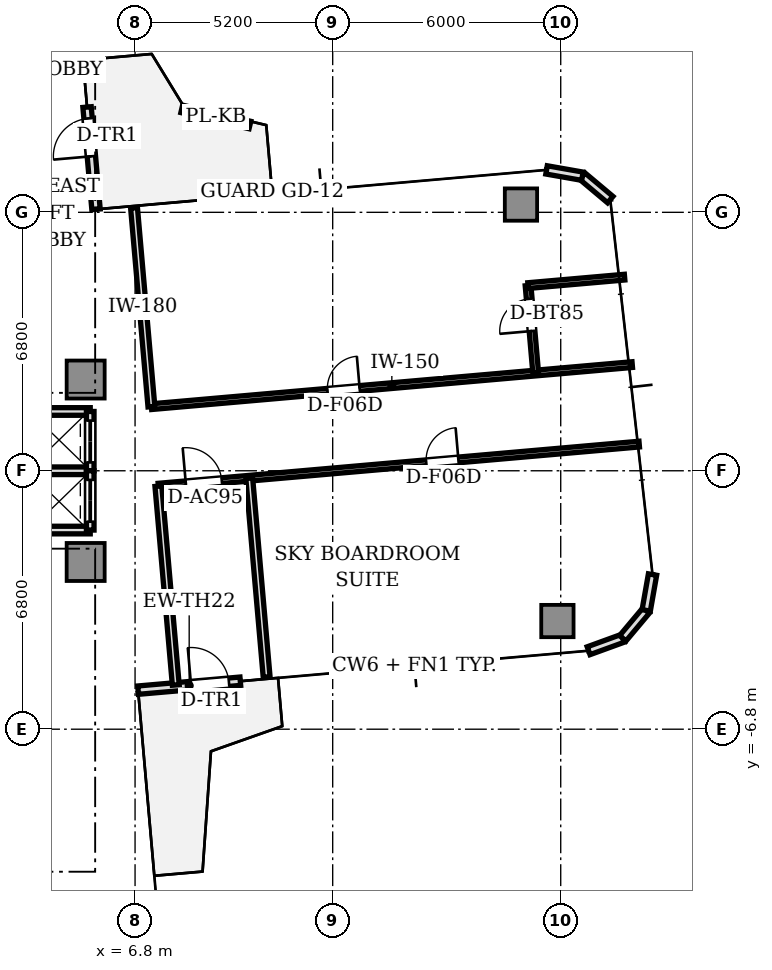
"""IFC4 building model, lengths in metres.
Left out: names, types, materials, properties, quantities, classifications, styles, units other than length and angle.
Written with IfcOpenShell. Run it as: python <this file> out.ifc"""

import sys

from ifc_helpers import new_model, si_unit, direction, frame, frame_2d, origin, origin_2d, place, context, subcontext, project, spatial, rectangle, extrude, source, transform, mapped, element, fill, save


model = new_model("IFC4")
c1 = context("Model", 3, precision=1e-05, world=origin(), true_north=direction((0.0, 1.0)))
c2 = subcontext(c1, "Body", "Model", "MODEL_VIEW")
j1 = project(units=[si_unit("LENGTHUNIT", "METRE"), si_unit("PLANEANGLEUNIT", "RADIAN")], contexts=[c1])
p1 = place(None, origin())
s1 = spatial("IfcSite", under=j1, at=p1, CompositionType="ELEMENT")
p2 = place(p1, origin())
s2 = spatial("IfcBuilding", under=s1, at=p2, CompositionType="ELEMENT")
p3 = place(p2, frame((0.0, 0.0, 142.75)))
s3 = spatial("IfcBuildingStorey", under=s2, at=p3, CompositionType="ELEMENT", Elevation=142.75)
m1 = source(origin(), c2, "Body", "SweptSolid", [
    extrude(rectangle(XDim=1.0, YDim=1.0, at=origin_2d()), origin(), (0.0, 0.0, 1.0), 4.26),
])
for number, where, z_axis, x_axis in (
    (1, (5.5, 2.4, 0.0), (0.0, 0.0, 1.0), (1.0, 0.0, 0.0)),
    (2, (5.5, -2.4, 0.0), (0.0, 0.0, 1.0), (1.0, 0.0, 0.0)),
):
    element("IfcColumn", number, at=place(p3, frame(where, z_axis=z_axis, x_axis=x_axis)), inside=s3, PredefinedType="COLUMN", context=c2, shape_type="MappedRepresentation", body=[
        mapped(m1, transform((0.0, 0.0, 0.0), scale=1.0)),
    ])
m2 = source(origin(), c2, "Body", "SweptSolid", [
    extrude(rectangle(XDim=0.85, YDim=0.85, at=origin_2d()), origin(), (0.0, 0.0, 1.0), 4.26),
])
for number, where, z_axis, x_axis in (
    (3, (17.913, -3.954, 0.0), (0.0, 0.0, 1.0), (1.0, 0.0, 0.0)),
    (4, (16.954, 7.004, 0.0), (0.0, 0.0, 1.0), (1.0, 0.0, 0.0)),
):
    element("IfcColumn", number, at=place(p3, frame(where, z_axis=z_axis, x_axis=x_axis)), inside=s3, PredefinedType="COLUMN", context=c2, shape_type="MappedRepresentation", body=[
        mapped(m2, transform((0.0, 0.0, 0.0), scale=1.0)),
    ])
p4 = place(p3, frame((6.879, -5.772, 0.0), z_axis=(0.0, 0.0, 1.0), x_axis=(0.996193619346, 0.087168071984, 0.0)))
e5 = element("IfcWall", 5, at=p4, inside=s3, PredefinedType="STANDARD", context=c2, shape_type="SweptSolid", body=[
    extrude(rectangle(XDim=2.7, YDim=0.22, at=frame_2d((1.35, 0.0))), origin(), (0.0, 0.0, 1.0), 4.26),
])
p5 = place(p4, frame((1.4, 0.0, 0.0)))
e6 = element("IfcOpeningElement", 6, at=p5, cuts=e5, PredefinedType="OPENING", context=c2, shape_type="SweptSolid", body=[
    extrude(rectangle(XDim=1.0, YDim=2.2, at=frame_2d((0.5, 1.1))), frame((0.0, 0.12, 0.0), z_axis=(0.0, -1.0, 0.0), x_axis=(1.0, 0.0, 0.0)), (0.0, 0.0, 1.0), 0.24),
])
p6 = place(p3, frame((18.734, -4.735, 0.0), z_axis=(0.0, 0.0, 1.0), x_axis=(0.939741306239, 0.34188635151, 0.0)))
e7 = element("IfcWall", 7, at=p6, inside=s3, PredefinedType="STANDARD", context=c2, shape_type="SweptSolid", body=[
    extrude(rectangle(XDim=0.958, YDim=0.22, at=frame_2d((0.479, 0.0))), origin(), (0.0, 0.0, 1.0), 4.26),
])
for number, where, z_axis, x_axis in (
    (8, (19.634, -4.408, 0.0), (0.0, 0.0, 1.0), (0.643, 0.766, 0.0)),
    (9, (20.25, -3.674, 0.0), (0.0, 0.0, 1.0), (0.174, 0.985, 0.0)),
):
    element("IfcWall", number, at=place(p3, frame(where, z_axis=z_axis, x_axis=x_axis)), inside=s3, PredefinedType="STANDARD", context=c2, shape_type="SweptSolid", body=[
        extrude(rectangle(XDim=0.958, YDim=0.22, at=frame_2d((0.479, 0.0))), origin(), (0.0, 0.0, 1.0), 4.26),
    ])
p7 = place(p3, frame((19.304, 7.135, 0.0), z_axis=(0.0, 0.0, 1.0), x_axis=(-0.766001159887, 0.642839189107, 0.0)))
e10 = element("IfcWall", 10, at=p7, inside=s3, PredefinedType="STANDARD", context=c2, shape_type="SweptSolid", body=[
    extrude(rectangle(XDim=0.958, YDim=0.22, at=frame_2d((0.479, 0.0))), origin(), (0.0, 0.0, 1.0), 4.26),
])
p8 = place(p3, frame((18.57, 7.75, 0.0), z_axis=(0.0, 0.0, 1.0), x_axis=(-0.984770724397, 0.173858046606, 0.0)))
e11 = element("IfcWall", 11, at=p8, inside=s3, PredefinedType="STANDARD", context=c2, shape_type="SweptSolid", body=[
    extrude(rectangle(XDim=0.958, YDim=0.22, at=frame_2d((0.479, 0.0))), origin(), (0.0, 0.0, 1.0), 4.26),
])
p9 = place(p3, frame((5.772, 6.879, 0.0), z_axis=(0.0, 0.0, 1.0), x_axis=(-0.087168071984, 0.996193619346, 0.0)))
e12 = element("IfcWall", 12, at=p9, inside=s3, PredefinedType="STANDARD", context=c2, shape_type="SweptSolid", body=[
    extrude(rectangle(XDim=2.7, YDim=0.22, at=frame_2d((1.35, 0.0))), origin(), (0.0, 0.0, 1.0), 4.26),
])
p10 = place(p9, frame((1.4, 0.0, 0.0)))
e13 = element("IfcOpeningElement", 13, at=p10, cuts=e12, PredefinedType="OPENING", context=c2, shape_type="SweptSolid", body=[
    extrude(rectangle(XDim=1.0, YDim=2.2, at=frame_2d((0.5, 1.1))), frame((0.0, 0.12, 0.0), z_axis=(0.0, -1.0, 0.0), x_axis=(1.0, 0.0, 0.0)), (0.0, 0.0, 1.0), 0.24),
])
p11 = place(p3, frame((9.822, 9.097, 0.0), z_axis=(0.0, 0.0, 1.0), x_axis=(-0.97309123406, 0.230420160135, 0.0)))
e14 = element("IfcWall", 14, at=p11, inside=s3, PredefinedType="PARAPET", context=c2, shape_type="SweptSolid", body=[
    extrude(rectangle(XDim=1.843, YDim=0.2, at=frame_2d((0.921, 0.0))), origin(), (0.0, 0.0, 1.0), 0.65),
])
for number, where, z_axis, x_axis in (
    (15, (3.98, 1.56, 0.0), (0.0, 0.0, 1.0), (1.0, 0.0, 0.0)),
    (16, (3.98, -1.56, 0.0), (0.0, 0.0, 1.0), (1.0, 0.0, 0.0)),
    (17, (3.98, 0.0, 0.0), (0.0, 0.0, 1.0), (1.0, 0.0, 0.0)),
):
    element("IfcWall", number, at=place(p3, frame(where, z_axis=z_axis, x_axis=x_axis)), inside=s3, PredefinedType="SOLIDWALL", context=c2, shape_type="SweptSolid", body=[
        extrude(rectangle(XDim=1.64, YDim=0.2, at=frame_2d((0.82, 0.0))), origin(), (0.0, 0.0, 1.0), 3.81),
    ])
p12 = place(p3, frame((5.62, 0.0, 0.0), z_axis=(0.0, 0.0, 1.0), x_axis=(0.0, 1.0, 0.0)))
e18 = element("IfcWall", 18, at=p12, inside=s3, PredefinedType="SOLIDWALL", context=c2, shape_type="SweptSolid", body=[
    extrude(rectangle(XDim=1.56, YDim=0.2, at=frame_2d((0.78, 0.0))), origin(), (0.0, 0.0, 1.0), 3.81),
])
p13 = place(p12, frame((0.22, 0.0, 0.0)))
e19 = element("IfcOpeningElement", 19, at=p13, cuts=e18, PredefinedType="OPENING", context=c2, shape_type="SweptSolid", body=[
    extrude(rectangle(XDim=1.1, YDim=2.2, at=frame_2d((0.55, 1.1))), frame((0.0, 0.11, 0.0), z_axis=(0.0, -1.0, 0.0), x_axis=(1.0, 0.0, 0.0)), (0.0, 0.0, 1.0), 0.22),
])
p14 = place(p3, frame((5.62, -1.56, 0.0), z_axis=(0.0, 0.0, 1.0), x_axis=(0.0, 1.0, 0.0)))
e20 = element("IfcWall", 20, at=p14, inside=s3, PredefinedType="SOLIDWALL", context=c2, shape_type="SweptSolid", body=[
    extrude(rectangle(XDim=1.56, YDim=0.2, at=frame_2d((0.78, 0.0))), origin(), (0.0, 0.0, 1.0), 3.81),
])
p15 = place(p14, frame((0.22, 0.0, 0.0)))
e21 = element("IfcOpeningElement", 21, at=p15, cuts=e20, PredefinedType="OPENING", context=c2, shape_type="SweptSolid", body=[
    extrude(rectangle(XDim=1.1, YDim=2.2, at=frame_2d((0.55, 1.1))), frame((0.0, 0.11, 0.0), z_axis=(0.0, -1.0, 0.0), x_axis=(1.0, 0.0, 0.0)), (0.0, 0.0, 1.0), 0.22),
])
p16 = place(p3, frame((7.23, 1.687, 0.0), z_axis=(0.0, 0.0, 1.0), x_axis=(0.996194280863, 0.087160511558, 0.0)))
e22 = element("IfcWall", 22, at=p16, inside=s3, PredefinedType="PARTITIONING", context=c2, shape_type="SweptSolid", body=[
    extrude(rectangle(XDim=12.7, YDim=0.15, at=frame_2d((6.35, 0.0))), origin(), (0.0, 0.0, 1.0), 3.81),
])
p17 = place(p16, frame((4.65, 0.0, 0.0)))
e23 = element("IfcOpeningElement", 23, at=p17, cuts=e22, PredefinedType="OPENING", context=c2, shape_type="SweptSolid", body=[
    extrude(rectangle(XDim=0.85, YDim=2.1, at=frame_2d((0.425, 1.05))), frame((0.0, 0.085, 0.0), z_axis=(0.0, -1.0, 0.0), x_axis=(1.0, 0.0, 0.0)), (0.0, 0.0, 1.0), 0.17),
])
p18 = place(p3, frame((7.414, -0.406, 0.0), z_axis=(0.0, 0.0, 1.0), x_axis=(0.996194280863, 0.087160511558, 0.0)))
e24 = element("IfcWall", 24, at=p18, inside=s3, PredefinedType="PARTITIONING", context=c2, shape_type="SweptSolid", body=[
    extrude(rectangle(XDim=12.7, YDim=0.15, at=frame_2d((6.35, 0.0))), origin(), (0.0, 0.0, 1.0), 3.81),
])
p19 = place(p18, frame((0.725, 0.0, 0.0)))
e25 = element("IfcOpeningElement", 25, at=p19, cuts=e24, PredefinedType="OPENING", context=c2, shape_type="SweptSolid", body=[
    extrude(rectangle(XDim=0.95, YDim=2.15, at=frame_2d((0.475, 1.075))), frame((0.0, 0.085, 0.0), z_axis=(0.0, -1.0, 0.0), x_axis=(1.0, 0.0, 0.0)), (0.0, 0.0, 1.0), 0.17),
])
p20 = place(p18, frame((7.075, 0.0, 0.0)))
e26 = element("IfcOpeningElement", 26, at=p20, cuts=e24, PredefinedType="OPENING", context=c2, shape_type="SweptSolid", body=[
    extrude(rectangle(XDim=0.85, YDim=2.1, at=frame_2d((0.425, 1.05))), frame((0.0, 0.085, 0.0), z_axis=(0.0, -1.0, 0.0), x_axis=(1.0, 0.0, 0.0)), (0.0, 0.0, 1.0), 0.17),
])
for number, where, z_axis, x_axis in (
    (27, (7.23, 1.687, 0.0), (0.0, 0.0, 1.0), (-0.087, 0.996, 0.0)),
    (28, (7.871, -5.635, 0.0), (0.0, 0.0, 1.0), (-0.087, 0.996, 0.0)),
):
    element("IfcWall", number, at=place(p3, frame(where, z_axis=z_axis, x_axis=x_axis)), inside=s3, PredefinedType="PARTITIONING", context=c2, shape_type="SweptSolid", body=[
        extrude(rectangle(XDim=5.25, YDim=0.18, at=frame_2d((2.625, 0.0))), origin(), (0.0, 0.0, 1.0), 3.81),
    ])
p21 = place(p3, frame((17.342, 2.571, 0.0), z_axis=(0.0, 0.0, 1.0), x_axis=(-0.087094835072, 0.996200024947, 0.0)))
e29 = element("IfcWall", 29, at=p21, inside=s3, PredefinedType="PARTITIONING", context=c2, shape_type="SweptSolid", body=[
    extrude(rectangle(XDim=2.31, YDim=0.15, at=frame_2d((1.155, 0.0))), origin(), (0.0, 0.0, 1.0), 3.78),
])
p22 = place(p21, frame((1.11, 0.0, 0.0)))
e30 = element("IfcOpeningElement", 30, at=p22, cuts=e29, PredefinedType="OPENING", context=c2, shape_type="SweptSolid", body=[
    extrude(rectangle(XDim=0.85, YDim=2.1, at=frame_2d((0.425, 1.05))), frame((0.0, 0.085, 0.0), z_axis=(0.0, -1.0, 0.0), x_axis=(1.0, 0.0, 0.0)), (0.0, 0.0, 1.0), 0.17),
])
p23 = place(p3, frame((17.141, 4.872, 0.0), z_axis=(0.0, 0.0, 1.0), x_axis=(0.996189039596, 0.08722039549, 0.0)))
e31 = element("IfcWall", 31, at=p23, inside=s3, PredefinedType="PARTITIONING", context=c2, shape_type="SweptSolid", body=[
    extrude(rectangle(XDim=2.55, YDim=0.15, at=frame_2d((1.275, 0.0))), origin(), (0.0, 0.0, 1.0), 3.81),
])
p24 = place(p3, frame((9.804, -0.196, 0.0), z_axis=(0.0, 0.0, 1.0), x_axis=(0.087147336495, -0.996195433508, 0.0)))
e32 = element("IfcWall", 32, at=p24, inside=s3, PredefinedType="PARTITIONING", context=c2, shape_type="SweptSolid", body=[
    extrude(rectangle(XDim=5.25, YDim=0.18, at=frame_2d((2.625, 0.0))), origin(), (0.0, 0.0, 1.0), 3.81),
])
p25 = place(p3, frame((5.287, 11.856, 0.0), z_axis=(0.0, 0.0, 1.0), x_axis=(-0.996194790044, -0.087154691724, 0.0)))
e33 = element("IfcWall", 33, at=p25, inside=s3, PredefinedType="PARTITIONING", context=c2, shape_type="SweptSolid", body=[
    extrude(rectangle(XDim=12.6, YDim=0.15, at=frame_2d((6.3, 0.0))), origin(), (0.0, 0.0, 1.0), 3.81),
])
p26 = place(p25, frame((5.5, 0.0, 0.0)))
e34 = element("IfcOpeningElement", 34, at=p26, cuts=e33, PredefinedType="OPENING", context=c2, shape_type="SweptSolid", body=[
    extrude(rectangle(XDim=1.6, YDim=2.25, at=frame_2d((0.8, 1.125))), frame((0.0, 0.085, 0.0), z_axis=(0.0, -1.0, 0.0), x_axis=(1.0, 0.0, 0.0)), (0.0, 0.0, 1.0), 0.17),
])
m3 = source(origin(), c2, "Body", "SweptSolid", [
    extrude(rectangle(XDim=1.0, YDim=0.05, at=origin_2d()), origin(), (0.0, 0.0, 1.0), 2.2),
])
p27 = place(p5, frame((0.5, 0.0, 0.0)))
e35 = element("IfcDoor", 35, at=p27, inside=s3, OperationType="SINGLE_SWING_LEFT", PredefinedType="DOOR", context=c2, shape_type="MappedRepresentation", body=[
    mapped(m3, transform((0.0, 0.0, 0.0), scale=1.0)),
])
fill(e6, e35)
p28 = place(p10, frame((0.5, 0.0, 0.0)))
e36 = element("IfcDoor", 36, at=p28, inside=s3, OperationType="SINGLE_SWING_LEFT", PredefinedType="DOOR", context=c2, shape_type="MappedRepresentation", body=[
    mapped(m3, transform((0.0, 0.0, 0.0), scale=1.0)),
])
fill(e13, e36)
m4 = source(origin(), c2, "Body", "SweptSolid", [
    extrude(rectangle(XDim=1.1, YDim=0.05, at=origin_2d()), origin(), (0.0, 0.0, 1.0), 2.2),
])
p29 = place(p13, frame((0.55, 0.0, 0.0)))
e37 = element("IfcDoor", 37, at=p29, inside=s3, OperationType="DOUBLE_DOOR_SLIDING", PredefinedType="DOOR", context=c2, shape_type="MappedRepresentation", body=[
    mapped(m4, transform((0.0, 0.0, 0.0), scale=1.0)),
])
fill(e19, e37)
p30 = place(p15, frame((0.55, 0.0, 0.0)))
e38 = element("IfcDoor", 38, at=p30, inside=s3, OperationType="DOUBLE_DOOR_SLIDING", PredefinedType="DOOR", context=c2, shape_type="MappedRepresentation", body=[
    mapped(m4, transform((0.0, 0.0, 0.0), scale=1.0)),
])
fill(e21, e38)
m5 = source(origin(), c2, "Body", "SweptSolid", [
    extrude(rectangle(XDim=0.85, YDim=0.05, at=origin_2d()), origin(), (0.0, 0.0, 1.0), 2.1),
])
p31 = place(p22, frame((0.425, 0.0, 0.0)))
e39 = element("IfcDoor", 39, at=p31, inside=s3, OperationType="SINGLE_SWING_LEFT", PredefinedType="DOOR", context=c2, shape_type="MappedRepresentation", body=[
    mapped(m5, transform((0.0, 0.0, 0.0), scale=1.0)),
])
fill(e30, e39)
p32 = place(p17, frame((0.425, 0.0, 0.0)))
e40 = element("IfcDoor", 40, at=p32, inside=s3, OperationType="SINGLE_SWING_RIGHT", PredefinedType="DOOR", context=c2, shape_type="MappedRepresentation", body=[
    mapped(m5, transform((0.0, 0.0, 0.0), scale=1.0)),
])
fill(e23, e40)
m6 = source(origin(), c2, "Body", "SweptSolid", [
    extrude(rectangle(XDim=0.95, YDim=0.05, at=origin_2d()), origin(), (0.0, 0.0, 1.0), 2.15),
])
p33 = place(p19, frame((0.475, 0.0, 0.0)))
e41 = element("IfcDoor", 41, at=p33, inside=s3, OperationType="SINGLE_SWING_LEFT", PredefinedType="DOOR", context=c2, shape_type="MappedRepresentation", body=[
    mapped(m6, transform((0.0, 0.0, 0.0), scale=1.0)),
])
fill(e25, e41)
p34 = place(p20, frame((0.425, 0.0, 0.0)))
e42 = element("IfcDoor", 42, at=p34, inside=s3, OperationType="SINGLE_SWING_RIGHT", PredefinedType="DOOR", context=c2, shape_type="MappedRepresentation", body=[
    mapped(m5, transform((0.0, 0.0, 0.0), scale=1.0)),
])
fill(e26, e42)
save(model, sys.argv[1])
